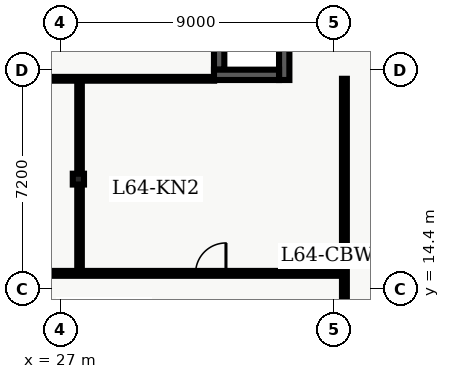
"""IFC4 building model, lengths in metres.
Left out: names, types, materials, properties, quantities, classifications, styles, units other than length and angle.
Written with IfcOpenShell. Run it as: python <this file> out.ifc"""

import sys

from ifc_helpers import new_model, entity, si_unit, converted_unit, direction, frame, origin_with_axes, origin_2d_with_axis, place, context, subcontext, project, spatial, polyline, rectangle, i_section, outline, extrude, element, fill, save


model = new_model("IFC4")
c1 = context("Model", 3, precision=1e-05, world=origin_with_axes(), true_north=direction((0.0, 1.0)))
c2 = subcontext(c1, "Body", "Model", "MODEL_VIEW")
j1 = project(units=[si_unit("LENGTHUNIT", "METRE"), converted_unit("PLANEANGLEUNIT", "DEGREE", entity("IfcPlaneAngleMeasure", 0.017), si_unit("PLANEANGLEUNIT", "RADIAN"), dimensions=[0, 0, 0, 0, 0, 0, 0])], contexts=[c1])
p1 = place(None, origin_with_axes())
s1 = spatial("IfcSite", under=j1, at=p1, CompositionType="ELEMENT")
p2 = place(p1, origin_with_axes())
s2 = spatial("IfcBuilding", under=s1, at=p2, CompositionType="ELEMENT")
p3 = place(p2, frame((0.0, 0.0, 260.7), z_axis=(0.0, 0.0, 1.0), x_axis=(1.0, 0.0, 0.0)))
s3 = spatial("IfcBuildingStorey", under=s2, at=p3, CompositionType="ELEMENT", Elevation=260.7)
p4 = place(p3, frame((27.6, 18.0, 0.0), z_axis=(0.0, 0.0, 1.0), x_axis=(1.0, 0.0, 0.0)))
e1 = element("IfcColumn", 1, at=p4, inside=s3, PredefinedType="COLUMN", context=c2, shape_type="SweptSolid", body=[
    extrude(i_section(OverallWidth=0.369, OverallDepth=0.356, WebThickness=0.011, FlangeThickness=0.018, FilletRadius=0.018, at=origin_2d_with_axis()), origin_with_axes(), (0.0, 0.0, 1.0), 3.9),
])
p5 = place(p3, frame((20.3, 14.9, 0.0), z_axis=(0.0, 0.0, 1.0), x_axis=(1.0, 0.0, 0.0)))
e2 = element("IfcWall", 2, at=p5, inside=s3, PredefinedType="PARTITIONING", context=c2, shape_type="SweptSolid", body=[
    extrude(outline(polyline([(0.0, -0.08), (16.05, -0.08), (16.05, 0.08), (0.0, 0.08), (0.0, -0.08)])), origin_with_axes(), (0.0, 0.0, 1.0), 2.7),
])
p6 = place(p5, frame((3.759, 0.0, 0.0), z_axis=(0.0, 0.0, 1.0), x_axis=(1.0, 0.0, 0.0)))
e3 = element("IfcOpeningElement", 3, at=p6, cuts=e2, PredefinedType="OPENING", context=c2, shape_type="SweptSolid", body=[
    extrude(rectangle(XDim=1.0, YDim=0.18, at=origin_2d_with_axis()), origin_with_axes(), (0.0, 0.0, 1.0), 2.15),
])
p7 = place(p5, frame((11.654, 0.0, 0.0), z_axis=(0.0, 0.0, 1.0), x_axis=(1.0, 0.0, 0.0)))
e4 = element("IfcOpeningElement", 4, at=p7, cuts=e2, PredefinedType="OPENING", context=c2, shape_type="SweptSolid", body=[
    extrude(rectangle(XDim=1.0, YDim=0.18, at=origin_2d_with_axis()), origin_with_axes(), (0.0, 0.0, 1.0), 2.15),
])
p8 = place(p3, frame((36.35, 4.35, 0.0), z_axis=(0.0, 0.0, 1.0), x_axis=(0.0, 1.0, 0.0)))
e5 = element("IfcWall", 5, at=p8, inside=s3, PredefinedType="PARTITIONING", context=c2, shape_type="SweptSolid", body=[
    extrude(outline(polyline([(0.0, -0.08), (16.95, -0.08), (16.95, 0.08), (0.0, 0.08), (0.0, -0.08)])), origin_with_axes(), (0.0, 0.0, 1.0), 2.7),
])
p9 = place(p3, frame((27.638, 15.02, 0.0), z_axis=(0.0, 0.0, 1.0), x_axis=(0.0, 1.0, 0.0)))
e6 = element("IfcWall", 6, at=p9, inside=s3, PredefinedType="PARTITIONING", context=c2, shape_type="SweptSolid", body=[
    extrude(outline(polyline([(0.0, -0.075), (6.2, -0.075), (6.2, 0.075), (0.0, 0.075), (0.0, -0.075)])), origin_with_axes(), (0.0, 0.0, 1.0), 2.7),
])
p10 = place(p3, frame((20.3, 21.3, 0.0), z_axis=(0.0, 0.0, 1.0), x_axis=(1.0, 0.0, 0.0)))
e7 = element("IfcWall", 7, at=p10, inside=s3, PredefinedType="PARTITIONING", context=c2, shape_type="SweptSolid", body=[
    extrude(outline(polyline([(0.0, -0.062), (11.765, -0.062), (11.765, 0.062), (0.0, 0.062), (0.0, -0.062)])), origin_with_axes(), (0.0, 0.0, 1.0), 2.7),
])
p11 = place(p3, frame((34.37, 21.26, 0.0), z_axis=(0.0, 0.0, 1.0), x_axis=(0.0, 1.0, 0.0)))
e8 = element("IfcWall", 8, at=p11, inside=s3, PredefinedType="SOLIDWALL", context=c2, shape_type="SweptSolid", body=[
    extrude(outline(polyline([(0.0, -0.17), (7.54, -0.17), (7.54, 0.17), (0.0, 0.17), (0.0, -0.17)])), origin_with_axes(), (0.0, 0.0, 1.0), 3.66),
])
p12 = place(p11, frame((3.77, 0.0, 0.45), z_axis=(0.0, 0.0, 1.0), x_axis=(1.0, 0.0, 0.0)))
e9 = element("IfcOpeningElement", 9, at=p12, cuts=e8, PredefinedType="OPENING", context=c2, shape_type="SweptSolid", body=[
    extrude(rectangle(XDim=1.5, YDim=0.36, at=origin_2d_with_axis()), origin_with_axes(), (0.0, 0.0, 1.0), 2.1),
])
p13 = place(p3, frame((32.23, 41.82, 0.0), z_axis=(0.0, 0.0, 1.0), x_axis=(0.0, -1.0, 0.0)))
e10 = element("IfcWall", 10, at=p13, inside=s3, PredefinedType="SOLIDWALL", context=c2, shape_type="SweptSolid", body=[
    extrude(outline(polyline([(0.0, -0.17), (20.22, -0.17), (20.22, 0.17), (0.0, 0.17), (0.0, -0.17)])), origin_with_axes(), (0.0, 0.0, 1.0), 3.66),
])
p14 = place(p13, frame((2.978, 0.0, 0.45), z_axis=(0.0, 0.0, 1.0), x_axis=(1.0, 0.0, 0.0)))
e11 = element("IfcOpeningElement", 11, at=p14, cuts=e10, PredefinedType="OPENING", context=c2, shape_type="SweptSolid", body=[
    extrude(rectangle(XDim=1.5, YDim=0.36, at=origin_2d_with_axis()), origin_with_axes(), (0.0, 0.0, 1.0), 2.1),
])
p15 = place(p13, frame((7.732, 0.0, 0.45), z_axis=(0.0, 0.0, 1.0), x_axis=(1.0, 0.0, 0.0)))
e12 = element("IfcOpeningElement", 12, at=p15, cuts=e10, PredefinedType="OPENING", context=c2, shape_type="SweptSolid", body=[
    extrude(rectangle(XDim=1.5, YDim=0.36, at=origin_2d_with_axis()), origin_with_axes(), (0.0, 0.0, 1.0), 2.1),
])
p16 = place(p13, frame((13.337, 0.0, 0.45), z_axis=(0.0, 0.0, 1.0), x_axis=(1.0, 0.0, 0.0)))
e13 = element("IfcOpeningElement", 13, at=p16, cuts=e10, PredefinedType="OPENING", context=c2, shape_type="SweptSolid", body=[
    extrude(rectangle(XDim=1.5, YDim=0.36, at=origin_2d_with_axis()), origin_with_axes(), (0.0, 0.0, 1.0), 2.1),
])
p17 = place(p13, frame((17.242, 0.0, 0.45), z_axis=(0.0, 0.0, 1.0), x_axis=(1.0, 0.0, 0.0)))
e14 = element("IfcOpeningElement", 14, at=p17, cuts=e10, PredefinedType="OPENING", context=c2, shape_type="SweptSolid", body=[
    extrude(rectangle(XDim=1.5, YDim=0.36, at=origin_2d_with_axis()), origin_with_axes(), (0.0, 0.0, 1.0), 2.1),
])
p18 = place(p3, frame((32.06, 21.43, 0.0), z_axis=(0.0, 0.0, 1.0), x_axis=(1.0, 0.0, 0.0)))
e15 = element("IfcWall", 15, at=p18, inside=s3, PredefinedType="SOLIDWALL", context=c2, shape_type="SweptSolid", body=[
    extrude(outline(polyline([(0.0, -0.17), (2.14, -0.17), (2.14, 0.17), (0.0, 0.17), (0.0, -0.17)])), origin_with_axes(), (0.0, 0.0, 1.0), 3.66),
])
p19 = place(p5, frame((11.654, 0.0, 0.0), z_axis=(0.0, 0.0, 1.0), x_axis=(1.0, 0.0, 0.0)))
e16 = element("IfcDoor", 16, at=p19, inside=s3, OperationType="SINGLE_SWING_RIGHT", PredefinedType="DOOR", context=c2, shape_type="SweptSolid", body=[
    extrude(rectangle(XDim=1.0, YDim=0.09, at=origin_2d_with_axis()), origin_with_axes(), (0.0, 0.0, 1.0), 2.15),
])
fill(e4, e16)
save(model, sys.argv[1])
